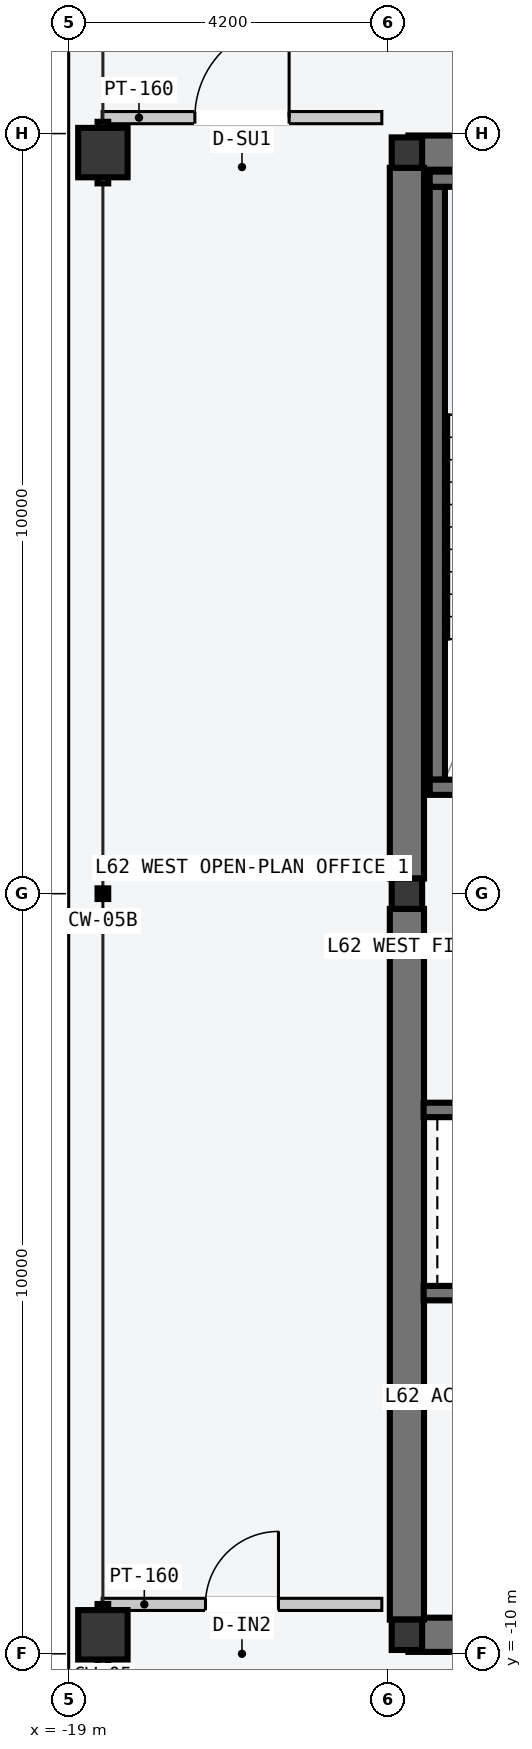
"""IFC4 building model, lengths in metres.
Left out: names, types, materials, properties, quantities, classifications, styles, units other than length and angle.
Written with IfcOpenShell. Run it as: python <this file> out.ifc"""

import sys

from ifc_helpers import new_model, si_unit, direction, frame, frame_2d, origin, origin_2d, place, context, subcontext, project, spatial, rectangle, hollow_rectangle, i_section, extrude, element, fill, save


model = new_model("IFC4")
c1 = context("Model", 3, precision=1e-05, world=origin(), true_north=direction((0.0, 1.0)))
c2 = subcontext(c1, "Body", "Model", "MODEL_VIEW")
j1 = project(units=[si_unit("LENGTHUNIT", "METRE"), si_unit("PLANEANGLEUNIT", "RADIAN")], contexts=[c1])
p1 = place(None, origin())
s1 = spatial("IfcSite", under=j1, at=p1, CompositionType="ELEMENT")
p2 = place(p1, origin())
s2 = spatial("IfcBuilding", under=s1, at=p2, CompositionType="ELEMENT")
p3 = place(p2, frame((0.0, 0.0, 236.4)))
s3 = spatial("IfcBuildingStorey", under=s2, at=p3, CompositionType="ELEMENT", Elevation=236.4)
for number, where, z_axis, x_axis in (
    (1, (-14.53, -9.75, -0.2), (0.0, 0.0, 1.0), (1.0, 0.0, 0.0)),
    (2, (-14.53, 9.75, -0.2), (0.0, 0.0, 1.0), (1.0, 0.0, 0.0)),
):
    element("IfcWall", number, at=place(p3, frame(where, z_axis=z_axis, x_axis=x_axis)), inside=s3, PredefinedType="SHEAR", context=c2, shape_type="SweptSolid", body=[
        extrude(rectangle(XDim=6.46, YDim=0.45, at=frame_2d((3.23, 0.0))), origin(), (0.0, 0.0, 1.0), 3.6),
    ])
for number, where, z_axis, x_axis in (
    (3, (-14.55, -9.55, -0.2), (0.0, 0.0, 1.0), (0.0, 1.0, 0.0)),
    (4, (-14.55, 0.2, -0.2), (0.0, 0.0, 1.0), (0.0, 1.0, 0.0)),
):
    element("IfcWall", number, at=place(p3, frame(where, z_axis=z_axis, x_axis=x_axis)), inside=s3, PredefinedType="SHEAR", context=c2, shape_type="SweptSolid", body=[
        extrude(rectangle(XDim=9.35, YDim=0.45, at=frame_2d((4.675, 0.0))), origin(), (0.0, 0.0, 1.0), 3.6),
    ])
p4 = place(p3, frame((-14.15, 1.5, -0.2), z_axis=(0.0, 0.0, 1.0), x_axis=(0.0, 1.0, 0.0)))
e5 = element("IfcWall", 5, at=p4, inside=s3, PredefinedType="SOLIDWALL", context=c2, shape_type="SweptSolid", body=[
    extrude(rectangle(XDim=7.8, YDim=0.2, at=frame_2d((3.9, 0.0))), origin(), (0.0, 0.0, 1.0), 3.6),
])
p5 = place(p3, frame((-14.25, 1.4, -0.2), z_axis=(0.0, 0.0, 1.0), x_axis=(1.0, 0.0, 0.0)))
e6 = element("IfcWall", 6, at=p5, inside=s3, PredefinedType="SOLIDWALL", context=c2, shape_type="SweptSolid", body=[
    extrude(rectangle(XDim=3.72, YDim=0.2, at=frame_2d((1.86, 0.0))), origin(), (0.0, 0.0, 1.0), 3.6),
])
p6 = place(p5, frame((1.5, 0.0, 0.2)))
e7 = element("IfcOpeningElement", 7, at=p6, cuts=e6, PredefinedType="OPENING", context=c2, shape_type="SweptSolid", body=[
    extrude(rectangle(XDim=1.12, YDim=2.18, at=frame_2d((0.56, 1.09))), frame((0.0, 0.11, 0.0), z_axis=(0.0, -1.0, 0.0), x_axis=(1.0, 0.0, 0.0)), (0.0, 0.0, 1.0), 0.22),
])
p7 = place(p3, frame((-14.25, 9.4, -0.2), z_axis=(0.0, 0.0, 1.0), x_axis=(1.0, 0.0, 0.0)))
e8 = element("IfcWall", 8, at=p7, inside=s3, PredefinedType="SOLIDWALL", context=c2, shape_type="SweptSolid", body=[
    extrude(rectangle(XDim=3.72, YDim=0.2, at=frame_2d((1.86, 0.0))), origin(), (0.0, 0.0, 1.0), 3.6),
])
for number, where, z_axis, x_axis in (
    (9, (-14.55, -9.75, 0.0), (0.0, 0.0, 1.0), (1.0, 0.0, 0.0)),
    (10, (-14.55, 0.0, 0.0), (0.0, 0.0, 1.0), (1.0, 0.0, 0.0)),
    (11, (-14.55, 9.75, 0.0), (0.0, 0.0, 1.0), (1.0, 0.0, 0.0)),
):
    element("IfcColumn", number, at=place(p3, frame(where, z_axis=z_axis, x_axis=x_axis)), inside=s3, PredefinedType="COLUMN", context=c2, shape_type="SweptSolid", body=[
        extrude(i_section(OverallWidth=0.4, OverallDepth=0.4, WebThickness=0.013, FlangeThickness=0.021, at=origin_2d()), origin(), (0.0, 0.0, 1.0), 3.6),
    ])
for number, where, z_axis, x_axis in (
    (12, (-18.55, -9.75, 0.0), (0.0, 0.0, 1.0), (0.0, 1.0, 0.0)),
    (13, (-18.55, 9.75, 0.0), (0.0, 0.0, 1.0), (0.0, 1.0, 0.0)),
):
    element("IfcColumn", number, at=place(p3, frame(where, z_axis=z_axis, x_axis=x_axis)), inside=s3, PredefinedType="COLUMN", context=c2, shape_type="SweptSolid", body=[
        extrude(hollow_rectangle(XDim=0.65, YDim=0.65, WallThickness=0.028, at=origin_2d()), origin(), (0.0, 0.0, 1.0), 3.6),
    ])
p8 = place(p3, frame((-14.33, -2.845, -0.2), z_axis=(0.0, 0.0, 1.0), x_axis=(1.0, 0.0, 0.0)))
e14 = element("IfcWall", 14, at=p8, inside=s3, PredefinedType="SOLIDWALL", context=c2, shape_type="SweptSolid", body=[
    extrude(rectangle(XDim=2.68, YDim=0.19, at=frame_2d((1.34, 0.0))), origin(), (0.0, 0.0, 1.0), 3.6),
])
p9 = place(p8, frame((0.83, 0.0, 0.2)))
e15 = element("IfcOpeningElement", 15, at=p9, cuts=e14, PredefinedType="OPENING", context=c2, shape_type="SweptSolid", body=[
    extrude(rectangle(XDim=1.2, YDim=2.2, at=frame_2d((0.6, 1.1))), frame((0.0, 0.105, 0.0), z_axis=(0.0, -1.0, 0.0), x_axis=(1.0, 0.0, 0.0)), (0.0, 0.0, 1.0), 0.21),
])
p10 = place(p3, frame((-14.33, -5.255, -0.2), z_axis=(0.0, 0.0, 1.0), x_axis=(1.0, 0.0, 0.0)))
e16 = element("IfcWall", 16, at=p10, inside=s3, PredefinedType="SOLIDWALL", context=c2, shape_type="SweptSolid", body=[
    extrude(rectangle(XDim=2.68, YDim=0.19, at=frame_2d((1.34, 0.0))), origin(), (0.0, 0.0, 1.0), 3.6),
])
p11 = place(p3, frame((-18.56, 10.21, 0.0), z_axis=(0.0, 0.0, 1.0), x_axis=(1.0, 0.0, 0.0)))
e17 = element("IfcWall", 17, at=p11, inside=s3, PredefinedType="PARTITIONING", context=c2, shape_type="SweptSolid", body=[
    extrude(rectangle(XDim=3.68, YDim=0.16, at=frame_2d((1.84, 0.0))), origin(), (0.0, 0.0, 1.0), 3.4),
])
p12 = place(p11, frame((1.22, 0.0, 0.0)))
e18 = element("IfcOpeningElement", 18, at=p12, cuts=e17, PredefinedType="OPENING", context=c2, shape_type="SweptSolid", body=[
    extrude(rectangle(XDim=1.24, YDim=2.24, at=frame_2d((0.62, 1.12))), frame((0.0, 0.09, 0.0), z_axis=(0.0, -1.0, 0.0), x_axis=(1.0, 0.0, 0.0)), (0.0, 0.0, 1.0), 0.18),
])
p13 = place(p3, frame((-18.56, -9.35, 0.0), z_axis=(0.0, 0.0, 1.0), x_axis=(1.0, 0.0, 0.0)))
e19 = element("IfcWall", 19, at=p13, inside=s3, PredefinedType="PARTITIONING", context=c2, shape_type="SweptSolid", body=[
    extrude(rectangle(XDim=3.68, YDim=0.16, at=frame_2d((1.84, 0.0))), origin(), (0.0, 0.0, 1.0), 3.4),
])
p14 = place(p13, frame((1.36, 0.0, 0.0)))
e20 = element("IfcOpeningElement", 20, at=p14, cuts=e19, PredefinedType="OPENING", context=c2, shape_type="SweptSolid", body=[
    extrude(rectangle(XDim=0.96, YDim=2.18, at=frame_2d((0.48, 1.09))), frame((0.0, 0.09, 0.0), z_axis=(0.0, -1.0, 0.0), x_axis=(1.0, 0.0, 0.0)), (0.0, 0.0, 1.0), 0.18),
])
p15 = place(p12, origin())
e21 = element("IfcDoor", 21, at=p15, inside=s3, OperationType="SINGLE_SWING_RIGHT", PredefinedType="DOOR", context=c2, shape_type="SweptSolid", body=[
    extrude(rectangle(XDim=1.24, YDim=2.24, at=frame_2d((0.62, 1.12))), frame((0.0, 0.025, 0.0), z_axis=(0.0, -1.0, 0.0), x_axis=(1.0, 0.0, 0.0)), (0.0, 0.0, 1.0), 0.05),
])
fill(e18, e21)
p16 = place(p14, origin())
e22 = element("IfcDoor", 22, at=p16, inside=s3, OperationType="SINGLE_SWING_RIGHT", PredefinedType="DOOR", context=c2, shape_type="SweptSolid", body=[
    extrude(rectangle(XDim=0.96, YDim=2.18, at=frame_2d((0.48, 1.09))), frame((0.0, 0.025, 0.0), z_axis=(0.0, -1.0, 0.0), x_axis=(1.0, 0.0, 0.0)), (0.0, 0.0, 1.0), 0.05),
])
fill(e20, e22)
save(model, sys.argv[1])
